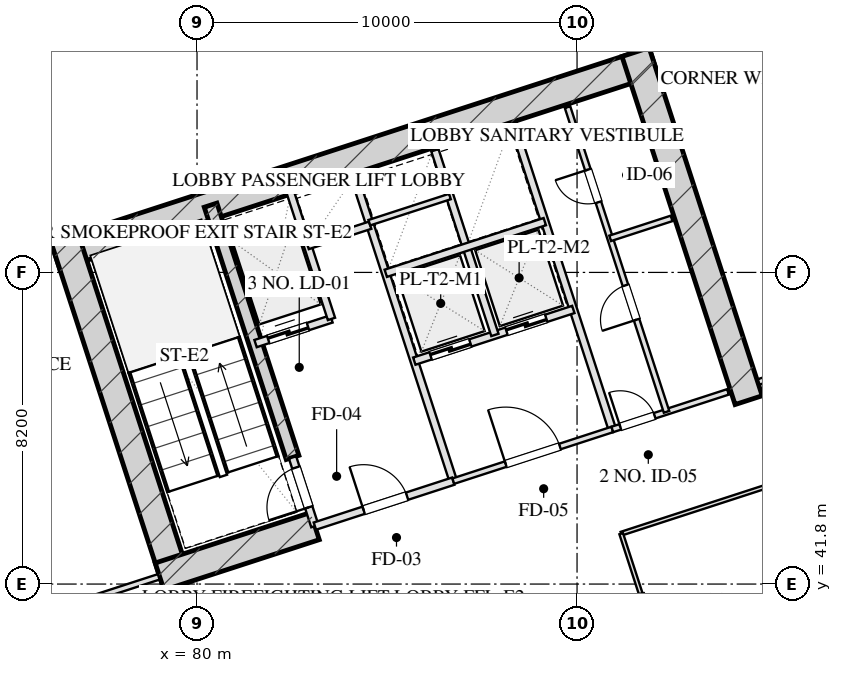
"""IFC4 building model, lengths in metres.
Left out: names, types, materials, properties, quantities, classifications, styles, units other than length and angle.
Written with IfcOpenShell. Run it as: python <this file> out.ifc"""

import sys

from ifc_helpers import new_model, si_unit, direction, frame, frame_2d, origin, place, context, subcontext, project, spatial, rectangle, extrude, element, fill, save


model = new_model("IFC4")
c1 = context("Model", 3, precision=1e-05, world=origin(), true_north=direction((0.0, 1.0)))
c2 = subcontext(c1, "Body", "Model", "MODEL_VIEW")
j1 = project(units=[si_unit("LENGTHUNIT", "METRE"), si_unit("PLANEANGLEUNIT", "RADIAN")], contexts=[c1])
p1 = place(None, origin())
s1 = spatial("IfcSite", under=j1, at=p1, CompositionType="ELEMENT")
p2 = place(p1, origin())
s2 = spatial("IfcBuilding", under=s1, at=p2, CompositionType="ELEMENT")
p3 = place(p2, frame((0.0, 0.0, 42.0)))
s3 = spatial("IfcBuildingStorey", under=s2, at=p3, CompositionType="ELEMENT", Elevation=42.0)
p4 = place(p3, frame((76.272, 50.443, 0.0), z_axis=(0.0, 0.0, 1.0), x_axis=(0.951056072937, 0.309018358888, 0.0)))
e1 = element("IfcWall", 1, at=p4, inside=s3, PredefinedType="SHEAR", context=c2, shape_type="SweptSolid", body=[
    extrude(rectangle(XDim=16.55, YDim=0.75, at=frame_2d((8.275, 0.0))), origin(), (0.0, 0.0, 1.0), 4.0),
])
for number, where, z_axis, x_axis in (
    (2, (79.489, 41.756, 0.0), (0.0, 0.0, 1.0), (-0.309, 0.951, 0.0)),
    (3, (94.515, 46.639, 0.0), (0.0, 0.0, 1.0), (-0.309, 0.951, 0.0)),
):
    element("IfcWall", number, at=place(p3, frame(where, z_axis=z_axis, x_axis=x_axis)), inside=s3, PredefinedType="SHEAR", context=c2, shape_type="SweptSolid", body=[
        extrude(rectangle(XDim=9.63, YDim=0.75, at=frame_2d((4.815, 0.0))), origin(), (0.0, 0.0, 1.0), 4.0),
    ])
p5 = place(p3, frame((82.514, 45.131, 0.0), z_axis=(0.0, 0.0, 1.0), x_axis=(-0.308988790936, 0.951065679686, 0.0)))
e4 = element("IfcWall", 4, at=p5, inside=s3, PredefinedType="SHEAR", context=c2, shape_type="SweptSolid", body=[
    extrude(rectangle(XDim=6.98, YDim=0.35, at=frame_2d((3.49, 0.0))), origin(), (0.0, 0.0, 1.0), 4.0),
])
p6 = place(p3, frame((79.016, 41.997, 0.0), z_axis=(0.0, 0.0, 1.0), x_axis=(0.95106038264, 0.309005094736, 0.0)))
e5 = element("IfcWall", 5, at=p6, inside=s3, PredefinedType="SHEAR", context=c2, shape_type="SweptSolid", body=[
    extrude(rectangle(XDim=4.295, YDim=0.75, at=frame_2d((2.147, 0.0))), origin(), (0.0, 0.0, 1.0), 4.0),
])
p7 = place(p3, frame((79.655, 4.352, 0.0), z_axis=(0.0, 0.0, 1.0), x_axis=(-0.309014526607, 0.951057318118, 0.0)))
e6 = element("IfcWall", 6, at=p7, inside=s3, PredefinedType="SOLIDWALL", context=c2, shape_type="SweptSolid", body=[
    extrude(rectangle(XDim=50.0, YDim=0.4, at=frame_2d((25.0, 0.0))), origin(), (0.0, 0.0, 1.0), 3.1),
])
p8 = place(p3, frame((66.002, 55.433, 0.0), z_axis=(0.0, 0.0, 1.0), x_axis=(0.951055939317, 0.309018770125, 0.0)))
e7 = element("IfcWall", 7, at=p8, inside=s3, PredefinedType="SOLIDWALL", context=c2, shape_type="SweptSolid", body=[
    extrude(rectangle(XDim=32.4, YDim=0.4, at=frame_2d((16.2, 0.0))), origin(), (0.0, 0.0, 1.0), 3.1),
])
p9 = place(p3, frame((83.101, 43.324, 0.0), z_axis=(0.0, 0.0, 1.0), x_axis=(-0.309048298632, 0.951046344356, 0.0)))
e8 = element("IfcWall", 8, at=p9, inside=s3, PredefinedType="PARTITIONING", context=c2, shape_type="SweptSolid", body=[
    extrude(rectangle(XDim=1.9, YDim=0.2, at=frame_2d((0.95, 0.0))), origin(), (0.0, 0.0, 1.0), 3.705),
])
p10 = place(p9, frame((0.52, 0.0, 0.0)))
e9 = element("IfcOpeningElement", 9, at=p10, cuts=e8, PredefinedType="OPENING", context=c2, shape_type="SweptSolid", body=[
    extrude(rectangle(XDim=1.1, YDim=2.05, at=frame_2d((0.55, 1.025))), frame((0.0, 0.11, 0.0), z_axis=(0.0, -1.0, 0.0), x_axis=(1.0, 0.0, 0.0)), (0.0, 0.0, 1.0), 0.22),
])
p11 = place(p3, frame((86.743, 44.508, 0.0), z_axis=(0.0, 0.0, 1.0), x_axis=(-0.309016001439, 0.951056838919, 0.0)))
e10 = element("IfcWall", 10, at=p11, inside=s3, PredefinedType="PARTITIONING", context=c2, shape_type="SweptSolid", body=[
    extrude(rectangle(XDim=8.43, YDim=0.2, at=frame_2d((4.215, 0.0))), origin(), (0.0, 0.0, 1.0), 3.705),
])
p12 = place(p3, frame((83.101, 43.324, 0.0), z_axis=(0.0, 0.0, 1.0), x_axis=(0.951052804469, 0.309028417967, 0.0)))
e11 = element("IfcWall", 11, at=p12, inside=s3, PredefinedType="PARTITIONING", context=c2, shape_type="SweptSolid", body=[
    extrude(rectangle(XDim=3.83, YDim=0.2, at=frame_2d((1.915, 0.0))), origin(), (0.0, 0.0, 1.0), 3.705),
])
p13 = place(p12, frame((1.35, 0.0, 0.0)))
e12 = element("IfcOpeningElement", 12, at=p13, cuts=e11, PredefinedType="OPENING", context=c2, shape_type="SweptSolid", body=[
    extrude(rectangle(XDim=1.2, YDim=2.05, at=frame_2d((0.6, 1.025))), frame((0.0, 0.11, 0.0), z_axis=(0.0, -1.0, 0.0), x_axis=(1.0, 0.0, 0.0)), (0.0, 0.0, 1.0), 0.22),
])
p14 = place(p3, frame((81.54, 48.127, 0.0), z_axis=(0.0, 0.0, 1.0), x_axis=(0.951062257173, 0.308999325213, 0.0)))
e13 = element("IfcWall", 13, at=p14, inside=s3, PredefinedType="PARTITIONING", context=c2, shape_type="SweptSolid", body=[
    extrude(rectangle(XDim=2.1, YDim=0.2, at=frame_2d((1.05, 0.0))), origin(), (0.0, 0.0, 1.0), 3.705),
])
p15 = place(p14, frame((0.35, 0.0, 0.0)))
e14 = element("IfcOpeningElement", 14, at=p15, cuts=e13, PredefinedType="OPENING", context=c2, shape_type="SweptSolid", body=[
    extrude(rectangle(XDim=1.1, YDim=2.05, at=frame_2d((0.55, 1.025))), frame((0.0, 0.11, 0.0), z_axis=(0.0, -1.0, 0.0), x_axis=(1.0, 0.0, 0.0)), (0.0, 0.0, 1.0), 0.22),
])
p16 = place(p3, frame((83.538, 48.776, 0.0), z_axis=(0.0, 0.0, 1.0), x_axis=(-0.3089935693, 0.951064127245, 0.0)))
e15 = element("IfcWall", 15, at=p16, inside=s3, PredefinedType="PARTITIONING", context=c2, shape_type="SweptSolid", body=[
    extrude(rectangle(XDim=3.7, YDim=0.2, at=frame_2d((1.85, 0.0))), origin(), (0.0, 0.0, 1.0), 3.705),
])
p17 = place(p3, frame((82.91, 50.707, 0.0), z_axis=(0.0, 0.0, 1.0), x_axis=(0.951041328149, 0.309063734775, 0.0)))
e16 = element("IfcWall", 16, at=p17, inside=s3, PredefinedType="PARTITIONING", context=c2, shape_type="SweptSolid", body=[
    extrude(rectangle(XDim=1.73, YDim=0.2, at=frame_2d((0.865, 0.0))), origin(), (0.0, 0.0, 1.0), 3.705),
])
p18 = place(p3, frame((90.928, 45.868, 0.0), z_axis=(0.0, 0.0, 1.0), x_axis=(-0.309042196757, 0.951048327176, 0.0)))
e17 = element("IfcWall", 17, at=p18, inside=s3, PredefinedType="PARTITIONING", context=c2, shape_type="SweptSolid", body=[
    extrude(rectangle(XDim=8.43, YDim=0.2, at=frame_2d((4.215, 0.0))), origin(), (0.0, 0.0, 1.0), 3.705),
])
p19 = place(p3, frame((86.743, 44.508, 0.0), z_axis=(0.0, 0.0, 1.0), x_axis=(0.951063829732, 0.308994485023, 0.0)))
e18 = element("IfcWall", 18, at=p19, inside=s3, PredefinedType="PARTITIONING", context=c2, shape_type="SweptSolid", body=[
    extrude(rectangle(XDim=4.4, YDim=0.15, at=frame_2d((2.2, 0.0))), origin(), (0.0, 0.0, 1.0), 3.705),
])
p20 = place(p19, frame((1.45, 0.0, 0.0)))
e19 = element("IfcOpeningElement", 19, at=p20, cuts=e18, PredefinedType="OPENING", context=c2, shape_type="SweptSolid", body=[
    extrude(rectangle(XDim=1.5, YDim=2.05, at=frame_2d((0.75, 1.025))), frame((0.0, 0.085, 0.0), z_axis=(0.0, -1.0, 0.0), x_axis=(1.0, 0.0, 0.0)), (0.0, 0.0, 1.0), 0.17),
])
p21 = place(p3, frame((85.718, 47.666, 0.0), z_axis=(0.0, 0.0, 1.0), x_axis=(0.951058531764, 0.30901079133, 0.0)))
e20 = element("IfcWall", 20, at=p21, inside=s3, PredefinedType="PARTITIONING", context=c2, shape_type="SweptSolid", body=[
    extrude(rectangle(XDim=4.4, YDim=0.2, at=frame_2d((2.2, 0.0))), origin(), (0.0, 0.0, 1.0), 3.705),
])
p22 = place(p21, frame((0.45, 0.0, 0.0)))
e21 = element("IfcOpeningElement", 21, at=p22, cuts=e20, PredefinedType="OPENING", context=c2, shape_type="SweptSolid", body=[
    extrude(rectangle(XDim=1.1, YDim=2.05, at=frame_2d((0.55, 1.025))), frame((0.0, 0.11, 0.0), z_axis=(0.0, -1.0, 0.0), x_axis=(1.0, 0.0, 0.0)), (0.0, 0.0, 1.0), 0.22),
])
p23 = place(p21, frame((2.55, 0.0, 0.0)))
e22 = element("IfcOpeningElement", 22, at=p23, cuts=e20, PredefinedType="OPENING", context=c2, shape_type="SweptSolid", body=[
    extrude(rectangle(XDim=1.1, YDim=2.05, at=frame_2d((0.55, 1.025))), frame((0.0, 0.11, 0.0), z_axis=(0.0, -1.0, 0.0), x_axis=(1.0, 0.0, 0.0)), (0.0, 0.0, 1.0), 0.22),
])
p24 = place(p3, frame((87.838, 48.354, 0.0), z_axis=(0.0, 0.0, 1.0), x_axis=(-0.3090093719, 0.951058992953, 0.0)))
e23 = element("IfcWall", 23, at=p24, inside=s3, PredefinedType="PARTITIONING", context=c2, shape_type="SweptSolid", body=[
    extrude(rectangle(XDim=5.11, YDim=0.2, at=frame_2d((2.555, 0.0))), origin(), (0.0, 0.0, 1.0), 3.705),
])
p25 = place(p3, frame((84.967, 49.977, 0.0), z_axis=(0.0, 0.0, 1.0), x_axis=(0.951063829732, 0.308994485023, 0.0)))
e24 = element("IfcWall", 24, at=p25, inside=s3, PredefinedType="PARTITIONING", context=c2, shape_type="SweptSolid", body=[
    extrude(rectangle(XDim=4.4, YDim=0.2, at=frame_2d((2.2, 0.0))), origin(), (0.0, 0.0, 1.0), 3.705),
])
p26 = place(p3, frame((84.534, 51.308, 0.0), z_axis=(0.0, 0.0, 1.0), x_axis=(0.951075093106, 0.308959814982, 0.0)))
e25 = element("IfcWall", 25, at=p26, inside=s3, PredefinedType="PARTITIONING", context=c2, shape_type="SweptSolid", body=[
    extrude(rectangle(XDim=2.23, YDim=0.15, at=frame_2d((1.115, 0.0))), origin(), (0.0, 0.0, 1.0), 3.705),
])
p27 = place(p3, frame((90.928, 45.868, 0.0), z_axis=(0.0, 0.0, 1.0), x_axis=(0.951059297078, 0.309008435874, 0.0)))
e26 = element("IfcWall", 26, at=p27, inside=s3, PredefinedType="PARTITIONING", context=c2, shape_type="SweptSolid", body=[
    extrude(rectangle(XDim=3.2, YDim=0.15, at=frame_2d((1.6, 0.0))), origin(), (0.0, 0.0, 1.0), 3.705),
])
p28 = place(p27, frame((0.22, 0.0, 0.0)))
e27 = element("IfcOpeningElement", 27, at=p28, cuts=e26, PredefinedType="OPENING", context=c2, shape_type="SweptSolid", body=[
    extrude(rectangle(XDim=0.95, YDim=2.05, at=frame_2d((0.475, 1.025))), frame((0.0, 0.085, 0.0), z_axis=(0.0, -1.0, 0.0), x_axis=(1.0, 0.0, 0.0)), (0.0, 0.0, 1.0), 0.17),
])
p29 = place(p3, frame((92.355, 46.331, 0.0), z_axis=(0.0, 0.0, 1.0), x_axis=(-0.309007490203, 0.951059604335, 0.0)))
e28 = element("IfcWall", 28, at=p29, inside=s3, PredefinedType="PARTITIONING", context=c2, shape_type="SweptSolid", body=[
    extrude(rectangle(XDim=8.43, YDim=0.15, at=frame_2d((4.215, 0.0))), origin(), (0.0, 0.0, 1.0), 3.705),
])
p30 = place(p29, frame((2.55, 0.0, 0.0)))
e29 = element("IfcOpeningElement", 29, at=p30, cuts=e28, PredefinedType="OPENING", context=c2, shape_type="SweptSolid", body=[
    extrude(rectangle(XDim=0.95, YDim=2.05, at=frame_2d((0.475, 1.025))), frame((0.0, 0.085, 0.0), z_axis=(0.0, -1.0, 0.0), x_axis=(1.0, 0.0, 0.0)), (0.0, 0.0, 1.0), 0.17),
])
p31 = place(p29, frame((5.8, 0.0, 0.0)))
e30 = element("IfcOpeningElement", 30, at=p31, cuts=e28, PredefinedType="OPENING", context=c2, shape_type="SweptSolid", body=[
    extrude(rectangle(XDim=0.9, YDim=2.05, at=frame_2d((0.45, 1.025))), frame((0.0, 0.085, 0.0), z_axis=(0.0, -1.0, 0.0), x_axis=(1.0, 0.0, 0.0)), (0.0, 0.0, 1.0), 0.17),
])
p32 = place(p3, frame((90.871, 50.896, 0.0), z_axis=(0.0, 0.0, 1.0), x_axis=(0.951054116971, 0.309024378638, 0.0)))
e31 = element("IfcWall", 31, at=p32, inside=s3, PredefinedType="PARTITIONING", context=c2, shape_type="SweptSolid", body=[
    extrude(rectangle(XDim=1.7, YDim=0.15, at=frame_2d((0.85, 0.0))), origin(), (0.0, 0.0, 1.0), 3.705),
])
p33 = place(p3, frame((68.721, 38.652, 0.0), z_axis=(0.0, 0.0, 1.0), x_axis=(0.951056658866, 0.309016555588, 0.0)))
e32 = element("IfcWall", 32, at=p33, inside=s3, PredefinedType="PARTITIONING", context=c2, shape_type="SweptSolid", body=[
    extrude(rectangle(XDim=10.8, YDim=0.15, at=frame_2d((5.4, 0.0))), origin(), (0.0, 0.0, 1.0), 3.705),
])
p34 = place(p33, frame((4.536, 0.0, 0.0)))
e33 = element("IfcOpeningElement", 33, at=p34, cuts=e32, PredefinedType="OPENING", context=c2, shape_type="SweptSolid", body=[
    extrude(rectangle(XDim=1.0, YDim=2.05, at=frame_2d((0.5, 1.025))), frame((0.0, 0.085, 0.0), z_axis=(0.0, -1.0, 0.0), x_axis=(1.0, 0.0, 0.0)), (0.0, 0.0, 1.0), 0.17),
])
p35 = place(p3, frame((94.78, 47.119, 0.0), z_axis=(0.0, 0.0, 1.0), x_axis=(0.951054294345, 0.309023832749, 0.0)))
e34 = element("IfcWall", 34, at=p35, inside=s3, PredefinedType="PARTITIONING", context=c2, shape_type="SweptSolid", body=[
    extrude(rectangle(XDim=10.2, YDim=0.15, at=frame_2d((5.1, 0.0))), origin(), (0.0, 0.0, 1.0), 3.705),
])
p36 = place(p35, frame((4.284, 0.0, 0.0)))
e35 = element("IfcOpeningElement", 35, at=p36, cuts=e34, PredefinedType="OPENING", context=c2, shape_type="SweptSolid", body=[
    extrude(rectangle(XDim=1.0, YDim=2.05, at=frame_2d((0.5, 1.025))), frame((0.0, 0.085, 0.0), z_axis=(0.0, -1.0, 0.0), x_axis=(1.0, 0.0, 0.0)), (0.0, 0.0, 1.0), 0.17),
])
p37 = place(p3, frame((69.549, 36.103, 0.0), z_axis=(0.0, 0.0, 1.0), x_axis=(0.951057491432, 0.309013993197, 0.0)))
e36 = element("IfcWall", 36, at=p37, inside=s3, PredefinedType="MOVABLE", context=c2, shape_type="SweptSolid", body=[
    extrude(rectangle(XDim=18.075, YDim=0.1, at=frame_2d((9.038, 0.0))), origin(), (0.0, 0.0, 1.0), 3.705),
])
p38 = place(p3, frame((91.162, 43.126, 0.0), z_axis=(0.0, 0.0, 1.0), x_axis=(0.951055535739, 0.309020012199, 0.0)))
e37 = element("IfcWall", 37, at=p38, inside=s3, PredefinedType="MOVABLE", context=c2, shape_type="SweptSolid", body=[
    extrude(rectangle(XDim=14.875, YDim=0.1, at=frame_2d((7.438, 0.0))), origin(), (0.0, 0.0, 1.0), 3.705),
])
p39 = place(p3, frame((91.882, 25.863, 0.0), z_axis=(0.0, 0.0, 1.0), x_axis=(-0.309022042254, 0.951054876125, 0.0)))
e38 = element("IfcWall", 38, at=p39, inside=s3, PredefinedType="MOVABLE", context=c2, shape_type="SweptSolid", body=[
    extrude(rectangle(XDim=16.64, YDim=0.1, at=frame_2d((8.32, 0.0))), origin(), (0.0, 0.0, 1.0), 3.705),
])
p40 = place(p39, frame((1.16, 0.0, 0.0)))
e39 = element("IfcOpeningElement", 39, at=p40, cuts=e38, PredefinedType="OPENING", context=c2, shape_type="SweptSolid", body=[
    extrude(rectangle(XDim=1.0, YDim=2.05, at=frame_2d((0.5, 1.025))), frame((0.0, 0.06, 0.0), z_axis=(0.0, -1.0, 0.0), x_axis=(1.0, 0.0, 0.0)), (0.0, 0.0, 1.0), 0.12),
])
p41 = place(p39, frame((6.16, 0.0, 0.0)))
e40 = element("IfcOpeningElement", 40, at=p41, cuts=e38, PredefinedType="OPENING", context=c2, shape_type="SweptSolid", body=[
    extrude(rectangle(XDim=1.0, YDim=2.05, at=frame_2d((0.5, 1.025))), frame((0.0, 0.06, 0.0), z_axis=(0.0, -1.0, 0.0), x_axis=(1.0, 0.0, 0.0)), (0.0, 0.0, 1.0), 0.12),
])
p42 = place(p39, frame((10.16, 0.0, 0.0)))
e41 = element("IfcOpeningElement", 41, at=p42, cuts=e38, PredefinedType="OPENING", context=c2, shape_type="SweptSolid", body=[
    extrude(rectangle(XDim=0.85, YDim=2.05, at=frame_2d((0.425, 1.025))), frame((0.0, 0.06, 0.0), z_axis=(0.0, -1.0, 0.0), x_axis=(1.0, 0.0, 0.0)), (0.0, 0.0, 1.0), 0.12),
])
p43 = place(p39, frame((14.48, 0.0, 0.0)))
e42 = element("IfcOpeningElement", 42, at=p43, cuts=e38, PredefinedType="OPENING", context=c2, shape_type="SweptSolid", body=[
    extrude(rectangle(XDim=1.0, YDim=2.05, at=frame_2d((0.5, 1.025))), frame((0.0, 0.06, 0.0), z_axis=(0.0, -1.0, 0.0), x_axis=(1.0, 0.0, 0.0)), (0.0, 0.0, 1.0), 0.12),
])
p44 = place(p3, frame((96.304, 27.3, 0.0), z_axis=(0.0, 0.0, 1.0), x_axis=(-0.30901773025, 0.951056277195, 0.0)))
e43 = element("IfcWall", 43, at=p44, inside=s3, PredefinedType="MOVABLE", context=c2, shape_type="SweptSolid", body=[
    extrude(rectangle(XDim=16.64, YDim=0.1, at=frame_2d((8.32, 0.0))), origin(), (0.0, 0.0, 1.0), 3.705),
])
p45 = place(p44, frame((1.66, 0.0, 0.0)))
e44 = element("IfcOpeningElement", 44, at=p45, cuts=e43, PredefinedType="OPENING", context=c2, shape_type="SweptSolid", body=[
    extrude(rectangle(XDim=1.05, YDim=2.05, at=frame_2d((0.525, 1.025))), frame((0.0, 0.06, 0.0), z_axis=(0.0, -1.0, 0.0), x_axis=(1.0, 0.0, 0.0)), (0.0, 0.0, 1.0), 0.12),
])
p46 = place(p44, frame((7.82, 0.0, 0.0)))
e45 = element("IfcOpeningElement", 45, at=p46, cuts=e43, PredefinedType="OPENING", context=c2, shape_type="SweptSolid", body=[
    extrude(rectangle(XDim=1.0, YDim=2.05, at=frame_2d((0.5, 1.025))), frame((0.0, 0.06, 0.0), z_axis=(0.0, -1.0, 0.0), x_axis=(1.0, 0.0, 0.0)), (0.0, 0.0, 1.0), 0.12),
])
p47 = place(p44, frame((13.98, 0.0, 0.0)))
e46 = element("IfcOpeningElement", 46, at=p47, cuts=e43, PredefinedType="OPENING", context=c2, shape_type="SweptSolid", body=[
    extrude(rectangle(XDim=1.0, YDim=2.05, at=frame_2d((0.5, 1.025))), frame((0.0, 0.06, 0.0), z_axis=(0.0, -1.0, 0.0), x_axis=(1.0, 0.0, 0.0)), (0.0, 0.0, 1.0), 0.12),
])
p48 = place(p3, frame((92.497, 39.017, 0.0), z_axis=(0.0, 0.0, 1.0), x_axis=(0.951055535739, 0.309020012199, 0.0)))
e47 = element("IfcWall", 47, at=p48, inside=s3, PredefinedType="MOVABLE", context=c2, shape_type="SweptSolid", body=[
    extrude(rectangle(XDim=14.875, YDim=0.1, at=frame_2d((7.438, 0.0))), origin(), (0.0, 0.0, 1.0), 3.705),
])
p49 = place(p10, origin())
e48 = element("IfcDoor", 48, at=p49, inside=s3, OperationType="SINGLE_SWING_LEFT", PredefinedType="DOOR", context=c2, shape_type="SweptSolid", body=[
    extrude(rectangle(XDim=1.1, YDim=2.05, at=frame_2d((0.55, 1.025))), frame((0.0, 0.025, 0.0), z_axis=(0.0, -1.0, 0.0), x_axis=(1.0, 0.0, 0.0)), (0.0, 0.0, 1.0), 0.05),
])
fill(e9, e48)
p50 = place(p13, origin())
e49 = element("IfcDoor", 49, at=p50, inside=s3, OperationType="SINGLE_SWING_LEFT", PredefinedType="DOOR", context=c2, shape_type="SweptSolid", body=[
    extrude(rectangle(XDim=1.2, YDim=2.05, at=frame_2d((0.6, 1.025))), frame((0.0, 0.025, 0.0), z_axis=(0.0, -1.0, 0.0), x_axis=(1.0, 0.0, 0.0)), (0.0, 0.0, 1.0), 0.05),
])
fill(e12, e49)
p51 = place(p15, origin())
e50 = element("IfcDoor", 50, at=p51, inside=s3, OperationType="DOUBLE_DOOR_SLIDING", PredefinedType="DOOR", context=c2, shape_type="SweptSolid", body=[
    extrude(rectangle(XDim=1.1, YDim=2.05, at=frame_2d((0.55, 1.025))), frame((0.0, 0.025, 0.0), z_axis=(0.0, -1.0, 0.0), x_axis=(1.0, 0.0, 0.0)), (0.0, 0.0, 1.0), 0.05),
])
fill(e14, e50)
p52 = place(p20, origin())
e51 = element("IfcDoor", 51, at=p52, inside=s3, OperationType="SINGLE_SWING_LEFT", PredefinedType="DOOR", context=c2, shape_type="SweptSolid", body=[
    extrude(rectangle(XDim=1.5, YDim=2.05, at=frame_2d((0.75, 1.025))), frame((0.0, 0.025, 0.0), z_axis=(0.0, -1.0, 0.0), x_axis=(1.0, 0.0, 0.0)), (0.0, 0.0, 1.0), 0.05),
])
fill(e19, e51)
p53 = place(p22, origin())
e52 = element("IfcDoor", 52, at=p53, inside=s3, OperationType="DOUBLE_DOOR_SLIDING", PredefinedType="DOOR", context=c2, shape_type="SweptSolid", body=[
    extrude(rectangle(XDim=1.1, YDim=2.05, at=frame_2d((0.55, 1.025))), frame((0.0, 0.025, 0.0), z_axis=(0.0, -1.0, 0.0), x_axis=(1.0, 0.0, 0.0)), (0.0, 0.0, 1.0), 0.05),
])
fill(e21, e52)
p54 = place(p23, origin())
e53 = element("IfcDoor", 53, at=p54, inside=s3, OperationType="DOUBLE_DOOR_SLIDING", PredefinedType="DOOR", context=c2, shape_type="SweptSolid", body=[
    extrude(rectangle(XDim=1.1, YDim=2.05, at=frame_2d((0.55, 1.025))), frame((0.0, 0.025, 0.0), z_axis=(0.0, -1.0, 0.0), x_axis=(1.0, 0.0, 0.0)), (0.0, 0.0, 1.0), 0.05),
])
fill(e22, e53)
p55 = place(p28, origin())
e54 = element("IfcDoor", 54, at=p55, inside=s3, OperationType="SINGLE_SWING_LEFT", PredefinedType="DOOR", context=c2, shape_type="SweptSolid", body=[
    extrude(rectangle(XDim=0.95, YDim=2.05, at=frame_2d((0.475, 1.025))), frame((0.0, 0.025, 0.0), z_axis=(0.0, -1.0, 0.0), x_axis=(1.0, 0.0, 0.0)), (0.0, 0.0, 1.0), 0.05),
])
fill(e27, e54)
p56 = place(p30, origin())
e55 = element("IfcDoor", 55, at=p56, inside=s3, OperationType="SINGLE_SWING_LEFT", PredefinedType="DOOR", context=c2, shape_type="SweptSolid", body=[
    extrude(rectangle(XDim=0.95, YDim=2.05, at=frame_2d((0.475, 1.025))), frame((0.0, 0.025, 0.0), z_axis=(0.0, -1.0, 0.0), x_axis=(1.0, 0.0, 0.0)), (0.0, 0.0, 1.0), 0.05),
])
fill(e29, e55)
p57 = place(p31, origin())
e56 = element("IfcDoor", 56, at=p57, inside=s3, OperationType="SINGLE_SWING_RIGHT", PredefinedType="DOOR", context=c2, shape_type="SweptSolid", body=[
    extrude(rectangle(XDim=0.9, YDim=2.05, at=frame_2d((0.45, 1.025))), frame((0.0, 0.025, 0.0), z_axis=(0.0, -1.0, 0.0), x_axis=(1.0, 0.0, 0.0)), (0.0, 0.0, 1.0), 0.05),
])
fill(e30, e56)
p58 = place(p47, origin())
e57 = element("IfcDoor", 57, at=p58, inside=s3, OperationType="SINGLE_SWING_RIGHT", PredefinedType="DOOR", context=c2, shape_type="SweptSolid", body=[
    extrude(rectangle(XDim=1.0, YDim=2.05, at=frame_2d((0.5, 1.025))), frame((0.0, 0.025, 0.0), z_axis=(0.0, -1.0, 0.0), x_axis=(1.0, 0.0, 0.0)), (0.0, 0.0, 1.0), 0.05),
])
fill(e46, e57)
save(model, sys.argv[1])
